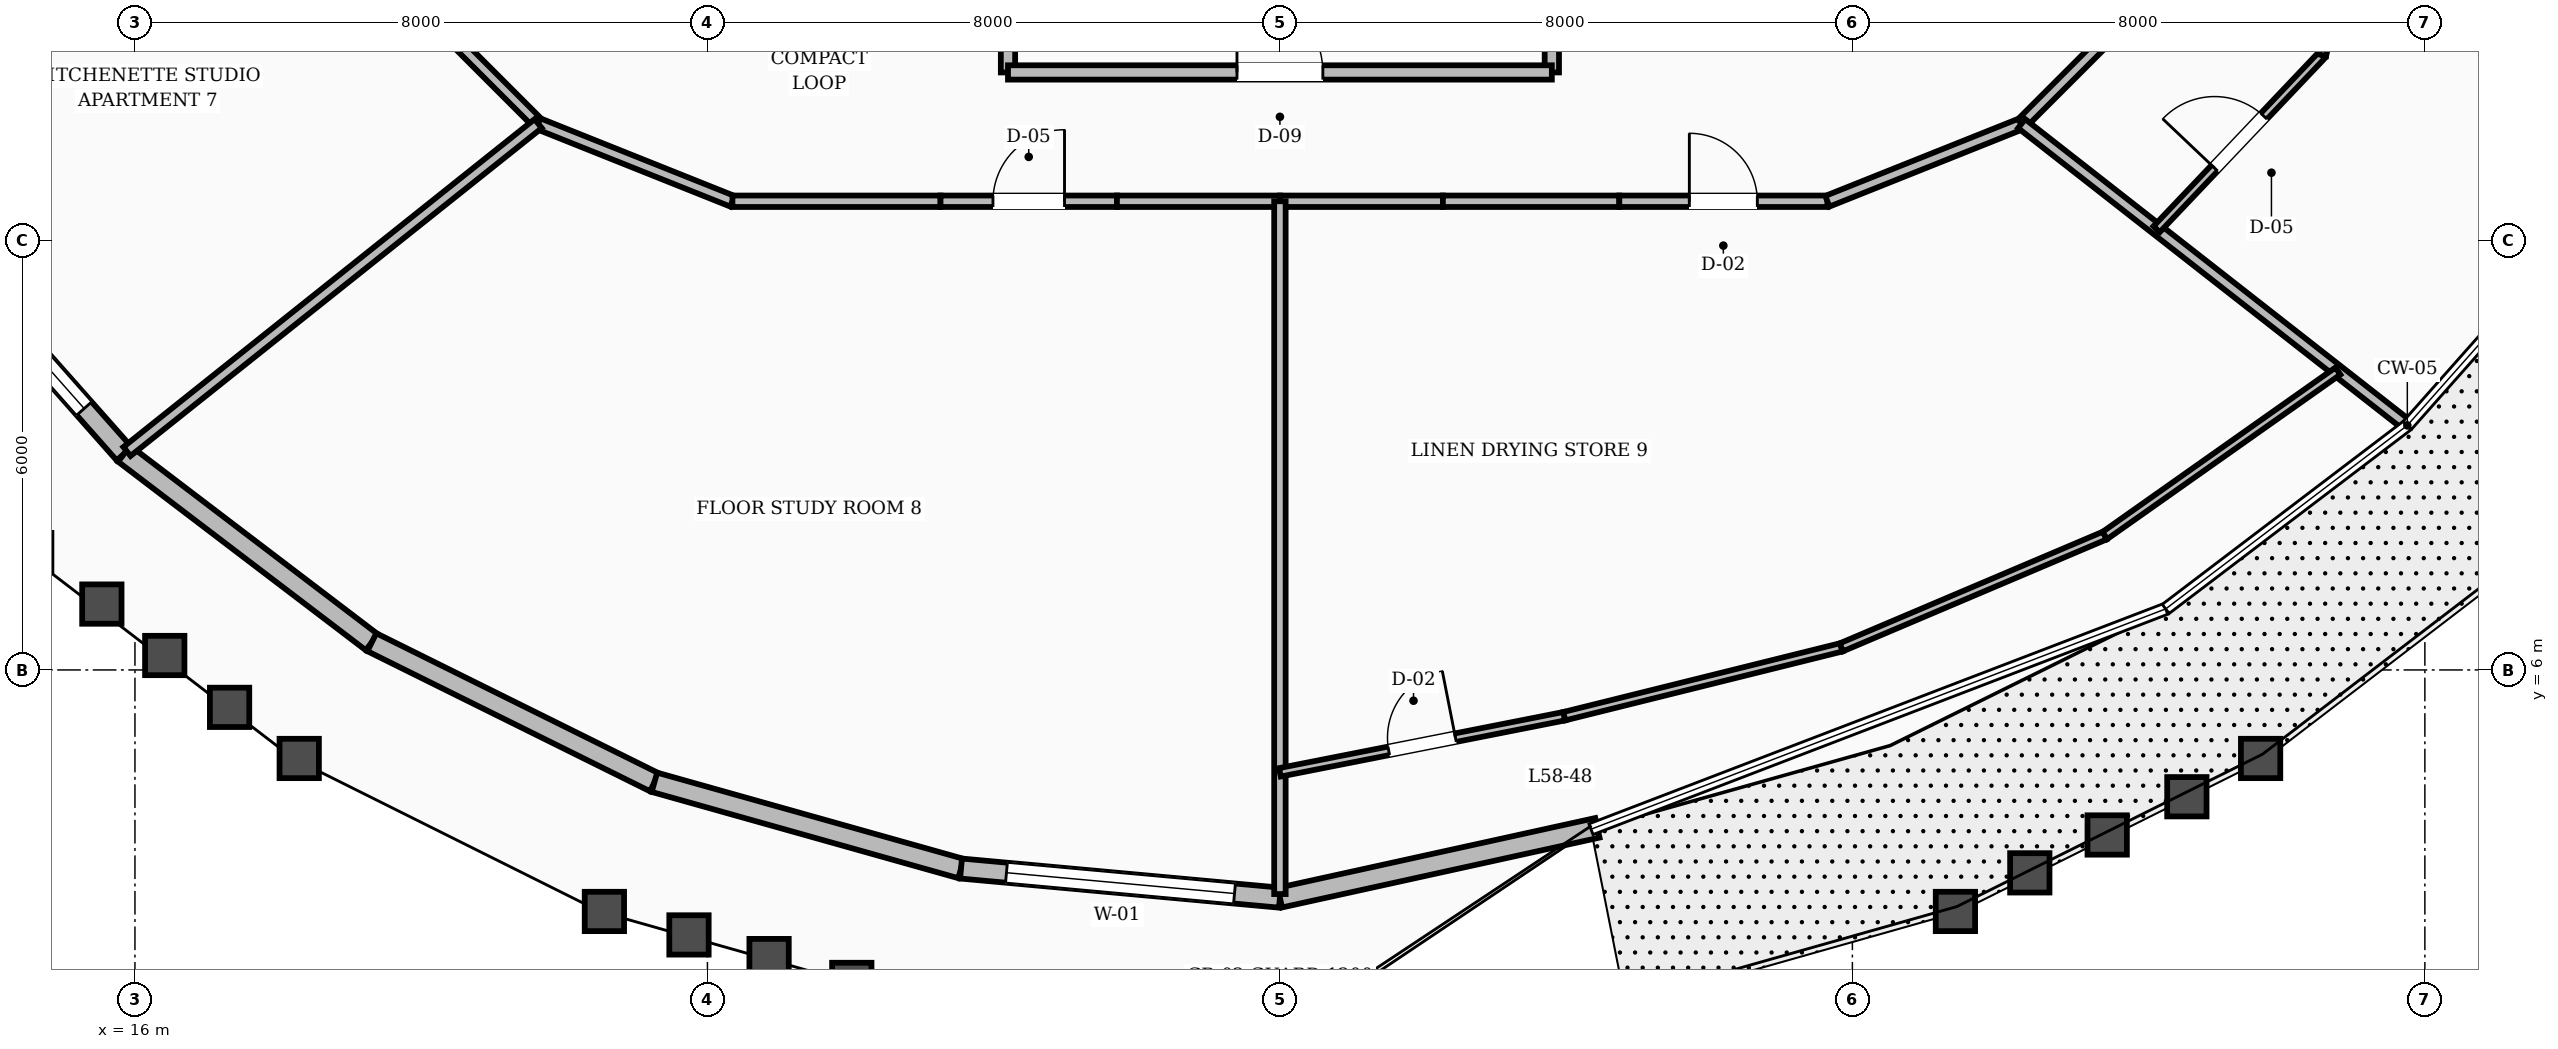
"""IFC4 building model, lengths in metres.
Left out: names, types, materials, properties, quantities, classifications, styles, units other than length and angle.
Written with IfcOpenShell. Run it as: python <this file> out.ifc"""

import sys

from ifc_helpers import new_model, si_unit, direction, frame, frame_2d, origin, place, context, subcontext, project, spatial, rectangle, extrude, element, fill, save


model = new_model("IFC4")
c1 = context("Model", 3, precision=1e-05, world=origin(), true_north=direction((0.0, 1.0)))
c2 = subcontext(c1, "Body", "Model", "MODEL_VIEW")
j1 = project(units=[si_unit("LENGTHUNIT", "METRE"), si_unit("PLANEANGLEUNIT", "RADIAN")], contexts=[c1])
p1 = place(None, origin())
s1 = spatial("IfcSite", under=j1, at=p1, CompositionType="ELEMENT")
p2 = place(p1, origin())
s2 = spatial("IfcBuilding", under=s1, at=p2, CompositionType="ELEMENT")
p3 = place(p2, frame((0.0, 0.0, 225.6)))
s3 = spatial("IfcBuildingStorey", under=s2, at=p3, CompositionType="ELEMENT", Elevation=225.6)
p4 = place(p3, frame((13.009, 12.232, 0.0), z_axis=(0.0, 0.0, 1.0), x_axis=(0.662704142497, -0.748881312037, 0.0)))
e1 = element("IfcWall", 1, at=p4, inside=s3, PredefinedType="STANDARD", context=c2, shape_type="SweptSolid", body=[
    extrude(rectangle(XDim=4.286, YDim=0.28, at=frame_2d((2.143, 0.0))), origin(), (0.0, 0.0, 1.0), 2.88),
])
p5 = place(p4, frame((0.843, 0.0, 0.8)))
e2 = element("IfcOpeningElement", 2, at=p5, cuts=e1, PredefinedType="OPENING", context=c2, shape_type="SweptSolid", body=[
    extrude(rectangle(XDim=2.6, YDim=1.65, at=frame_2d((1.3, 0.825))), frame((0.0, 0.15, 0.0), z_axis=(0.0, -1.0, 0.0), x_axis=(1.0, 0.0, 0.0)), (0.0, 0.0, 1.0), 0.3),
])
p6 = place(p3, frame((15.849, 9.022, 0.0), z_axis=(0.0, 0.0, 1.0), x_axis=(0.795722836513, -0.605660934394, 0.0)))
e3 = element("IfcWall", 3, at=p6, inside=s3, PredefinedType="STANDARD", context=c2, shape_type="SweptSolid", body=[
    extrude(rectangle(XDim=4.349, YDim=0.28, at=frame_2d((2.175, 0.0))), origin(), (0.0, 0.0, 1.0), 2.88),
])
p7 = place(p3, frame((19.31, 6.387, 0.0), z_axis=(0.0, 0.0, 1.0), x_axis=(0.89596177971, -0.44413116227, 0.0)))
e4 = element("IfcWall", 4, at=p7, inside=s3, PredefinedType="STANDARD", context=c2, shape_type="SweptSolid", body=[
    extrude(rectangle(XDim=4.407, YDim=0.28, at=frame_2d((2.204, 0.0))), origin(), (0.0, 0.0, 1.0), 2.88),
])
p8 = place(p3, frame((23.259, 4.43, 0.0), z_axis=(0.0, 0.0, 1.0), x_axis=(0.96263574912, -0.27079958367, 0.0)))
e5 = element("IfcWall", 5, at=p8, inside=s3, PredefinedType="STANDARD", context=c2, shape_type="SweptSolid", body=[
    extrude(rectangle(XDim=4.451, YDim=0.28, at=frame_2d((2.226, 0.0))), origin(), (0.0, 0.0, 1.0), 2.88),
])
p9 = place(p3, frame((27.544, 3.225, 0.0), z_axis=(0.0, 0.0, 1.0), x_axis=(0.995855104574, -0.090953893235, 0.0)))
e6 = element("IfcWall", 6, at=p9, inside=s3, PredefinedType="STANDARD", context=c2, shape_type="SweptSolid", body=[
    extrude(rectangle(XDim=4.475, YDim=0.28, at=frame_2d((2.237, 0.0))), origin(), (0.0, 0.0, 1.0), 2.88),
])
p10 = place(p9, frame((0.637, 0.0, 0.8)))
e7 = element("IfcOpeningElement", 7, at=p10, cuts=e6, PredefinedType="OPENING", context=c2, shape_type="SweptSolid", body=[
    extrude(rectangle(XDim=3.2, YDim=1.65, at=frame_2d((1.6, 0.825))), frame((0.0, 0.15, 0.0), z_axis=(0.0, -1.0, 0.0), x_axis=(1.0, 0.0, 0.0)), (0.0, 0.0, 1.0), 0.3),
])
p11 = place(p3, frame((32.0, 2.818, 0.0), z_axis=(0.0, 0.0, 1.0), x_axis=(0.976642662205, 0.214869984784, 0.0)))
e8 = element("IfcWall", 8, at=p11, inside=s3, PredefinedType="STANDARD", context=c2, shape_type="SweptSolid", body=[
    extrude(rectangle(XDim=4.543, YDim=0.28, at=frame_2d((2.271, 0.0))), origin(), (0.0, 0.0, 1.0), 2.88),
])
for number, where, z_axis, x_axis in (
    (9, (28.2, 14.35, 0.0), (0.0, 0.0, 1.0), (0.0, 1.0, 0.0)),
    (10, (35.8, 14.35, 0.0), (0.0, 0.0, 1.0), (0.0, 1.0, 0.0)),
):
    element("IfcWall", number, at=place(p3, frame(where, z_axis=z_axis, x_axis=x_axis)), inside=s3, PredefinedType="SOLIDWALL", context=c2, shape_type="SweptSolid", body=[
        extrude(rectangle(XDim=2.2, YDim=0.2, at=frame_2d((1.1, 0.0))), origin(), (0.0, 0.0, 1.0), 2.87),
    ])
p12 = place(p3, frame((28.2, 14.35, 0.0), z_axis=(0.0, 0.0, 1.0), x_axis=(1.0, 0.0, 0.0)))
e11 = element("IfcWall", 11, at=p12, inside=s3, PredefinedType="SOLIDWALL", context=c2, shape_type="SweptSolid", body=[
    extrude(rectangle(XDim=7.6, YDim=0.2, at=frame_2d((3.8, 0.0))), origin(), (0.0, 0.0, 1.0), 2.87),
])
p13 = place(p12, frame((3.2, 0.0, 0.0)))
e12 = element("IfcOpeningElement", 12, at=p13, cuts=e11, PredefinedType="OPENING", context=c2, shape_type="SweptSolid", body=[
    extrude(rectangle(XDim=1.2, YDim=2.1, at=frame_2d((0.6, 1.05))), frame((0.0, 0.11, 0.0), z_axis=(0.0, -1.0, 0.0), x_axis=(1.0, 0.0, 0.0)), (0.0, 0.0, 1.0), 0.22),
])
p14 = place(p3, frame((19.573, 15.697, 0.0), z_axis=(0.0, 0.0, 1.0), x_axis=(0.707106781187, -0.707106781187, 0.0)))
e13 = element("IfcWall", 13, at=p14, inside=s3, PredefinedType="SOLIDWALL", context=c2, shape_type="SweptSolid", body=[
    extrude(rectangle(XDim=2.916, YDim=0.16, at=frame_2d((1.458, 0.0))), origin(), (0.0, 0.0, 1.0), 2.87),
])
p15 = place(p3, frame((21.635, 13.635, 0.0), z_axis=(0.0, 0.0, 1.0), x_axis=(0.92856882165, -0.371160266542, 0.0)))
e14 = element("IfcWall", 14, at=p15, inside=s3, PredefinedType="SOLIDWALL", context=c2, shape_type="SweptSolid", body=[
    extrude(rectangle(XDim=2.923, YDim=0.16, at=frame_2d((1.461, 0.0))), origin(), (0.0, 0.0, 1.0), 2.87),
])
p16 = place(p3, frame((24.349, 12.55, 0.0), z_axis=(0.0, 0.0, 1.0), x_axis=(1.0, 0.0, 0.0)))
e15 = element("IfcWall", 15, at=p16, inside=s3, PredefinedType="SOLIDWALL", context=c2, shape_type="SweptSolid", body=[
    extrude(rectangle(XDim=2.908, YDim=0.16, at=frame_2d((1.454, 0.0))), origin(), (0.0, 0.0, 1.0), 2.87),
])
p17 = place(p3, frame((27.257, 12.55, 0.0), z_axis=(0.0, 0.0, 1.0), x_axis=(1.0, 0.0, 0.0)))
e16 = element("IfcWall", 16, at=p17, inside=s3, PredefinedType="SOLIDWALL", context=c2, shape_type="SweptSolid", body=[
    extrude(rectangle(XDim=2.465, YDim=0.16, at=frame_2d((1.232, 0.0))), origin(), (0.0, 0.0, 1.0), 2.87),
])
p18 = place(p17, frame((0.733, 0.0, 0.0)))
e17 = element("IfcOpeningElement", 17, at=p18, cuts=e16, PredefinedType="OPENING", context=c2, shape_type="SweptSolid", body=[
    extrude(rectangle(XDim=1.0, YDim=2.1, at=frame_2d((0.5, 1.05))), frame((0.0, 0.09, 0.0), z_axis=(0.0, -1.0, 0.0), x_axis=(1.0, 0.0, 0.0)), (0.0, 0.0, 1.0), 0.18),
])
for number, where, z_axis, x_axis in (
    (18, (29.722, 12.55, 0.0), (0.0, 0.0, 1.0), (1.0, 0.0, 0.0)),
    (19, (32.0, 12.55, 0.0), (0.0, 0.0, 1.0), (1.0, 0.0, 0.0)),
):
    element("IfcWall", number, at=place(p3, frame(where, z_axis=z_axis, x_axis=x_axis)), inside=s3, PredefinedType="SOLIDWALL", context=c2, shape_type="SweptSolid", body=[
        extrude(rectangle(XDim=2.278, YDim=0.16, at=frame_2d((1.139, 0.0))), origin(), (0.0, 0.0, 1.0), 2.87),
    ])
p19 = place(p3, frame((34.278, 12.55, 0.0), z_axis=(0.0, 0.0, 1.0), x_axis=(1.0, 0.0, 0.0)))
e20 = element("IfcWall", 20, at=p19, inside=s3, PredefinedType="SOLIDWALL", context=c2, shape_type="SweptSolid", body=[
    extrude(rectangle(XDim=2.465, YDim=0.16, at=frame_2d((1.232, 0.0))), origin(), (0.0, 0.0, 1.0), 2.87),
])
p20 = place(p3, frame((36.743, 12.55, 0.0), z_axis=(0.0, 0.0, 1.0), x_axis=(1.0, 0.0, 0.0)))
e21 = element("IfcWall", 21, at=p20, inside=s3, PredefinedType="SOLIDWALL", context=c2, shape_type="SweptSolid", body=[
    extrude(rectangle(XDim=2.908, YDim=0.16, at=frame_2d((1.454, 0.0))), origin(), (0.0, 0.0, 1.0), 2.87),
])
p21 = place(p20, frame((0.979, 0.0, 0.0)))
e22 = element("IfcOpeningElement", 22, at=p21, cuts=e21, PredefinedType="OPENING", context=c2, shape_type="SweptSolid", body=[
    extrude(rectangle(XDim=0.95, YDim=2.1, at=frame_2d((0.475, 1.05))), frame((0.0, 0.09, 0.0), z_axis=(0.0, -1.0, 0.0), x_axis=(1.0, 0.0, 0.0)), (0.0, 0.0, 1.0), 0.18),
])
p22 = place(p3, frame((39.651, 12.55, 0.0), z_axis=(0.0, 0.0, 1.0), x_axis=(0.92856882165, 0.371160266542, 0.0)))
e23 = element("IfcWall", 23, at=p22, inside=s3, PredefinedType="SOLIDWALL", context=c2, shape_type="SweptSolid", body=[
    extrude(rectangle(XDim=2.923, YDim=0.16, at=frame_2d((1.461, 0.0))), origin(), (0.0, 0.0, 1.0), 2.87),
])
p23 = place(p3, frame((42.365, 13.635, 0.0), z_axis=(0.0, 0.0, 1.0), x_axis=(0.707106781187, 0.707106781187, 0.0)))
e24 = element("IfcWall", 24, at=p23, inside=s3, PredefinedType="SOLIDWALL", context=c2, shape_type="SweptSolid", body=[
    extrude(rectangle(XDim=2.916, YDim=0.16, at=frame_2d((1.458, 0.0))), origin(), (0.0, 0.0, 1.0), 2.87),
])
p24 = place(p3, frame((42.365, 13.635, 0.0), z_axis=(0.0, 0.0, 1.0), x_axis=(0.78755504873, -0.61624430644, 0.0)))
e25 = element("IfcWall", 25, at=p24, inside=s3, PredefinedType="SOLIDWALL", context=c2, shape_type="SweptSolid", body=[
    extrude(rectangle(XDim=6.794, YDim=0.16, at=frame_2d((3.397, 0.0))), origin(), (0.0, 0.0, 1.0), 2.87),
])
p25 = place(p3, frame((44.251, 12.159, 0.0), z_axis=(0.0, 0.0, 1.0), x_axis=(0.688384139407, 0.725346314951, 0.0)))
e26 = element("IfcWall", 26, at=p25, inside=s3, PredefinedType="PARTITIONING", context=c2, shape_type="SweptSolid", body=[
    extrude(rectangle(XDim=3.355, YDim=0.12, at=frame_2d((1.678, 0.0))), origin(), (0.0, 0.0, 1.0), 2.87),
])
p26 = place(p25, frame((1.178, 0.0, 0.0)))
e27 = element("IfcOpeningElement", 27, at=p26, cuts=e26, PredefinedType="OPENING", context=c2, shape_type="SweptSolid", body=[
    extrude(rectangle(XDim=1.0, YDim=2.1, at=frame_2d((0.5, 1.05))), frame((0.0, 0.07, 0.0), z_axis=(0.0, -1.0, 0.0), x_axis=(1.0, 0.0, 0.0)), (0.0, 0.0, 1.0), 0.14),
])
p27 = place(p3, frame((46.561, 14.593, 0.0), z_axis=(0.0, 0.0, 1.0), x_axis=(0.224102977653, 0.974565470047, 0.0)))
e28 = element("IfcWall", 28, at=p27, inside=s3, PredefinedType="PARTITIONING", context=c2, shape_type="SweptSolid", body=[
    extrude(rectangle(XDim=3.371, YDim=0.12, at=frame_2d((1.685, 0.0))), origin(), (0.0, 0.0, 1.0), 2.87),
])
p28 = place(p3, frame((21.635, 13.635, 0.0), z_axis=(0.0, 0.0, 1.0), x_axis=(-0.781878901848, -0.623430335198, 0.0)))
e29 = element("IfcWall", 29, at=p28, inside=s3, PredefinedType="SOLIDWALL", context=c2, shape_type="SweptSolid", body=[
    extrude(rectangle(XDim=7.35, YDim=0.16, at=frame_2d((3.675, 0.0))), origin(), (0.0, 0.0, 1.0), 2.87),
])
p29 = place(p3, frame((32.0, 12.55, 0.0), z_axis=(0.0, 0.0, 1.0), x_axis=(0.0, -1.0, 0.0)))
e30 = element("IfcWall", 30, at=p29, inside=s3, PredefinedType="SOLIDWALL", context=c2, shape_type="SweptSolid", body=[
    extrude(rectangle(XDim=9.682, YDim=0.16, at=frame_2d((4.841, 0.0))), origin(), (0.0, 0.0, 1.0), 2.87),
])
p30 = place(p3, frame((32.0, 4.569, 0.0), z_axis=(0.0, 0.0, 1.0), x_axis=(0.98108276504, 0.19358876037, 0.0)))
e31 = element("IfcWall", 31, at=p30, inside=s3, PredefinedType="PARTITIONING", context=c2, shape_type="SweptSolid", body=[
    extrude(rectangle(XDim=4.051, YDim=0.12, at=frame_2d((2.025, 0.0))), origin(), (0.0, 0.0, 1.0), 2.87),
])
p31 = place(p30, frame((1.55, 0.0, 0.0)))
e32 = element("IfcOpeningElement", 32, at=p31, cuts=e31, PredefinedType="OPENING", context=c2, shape_type="SweptSolid", body=[
    extrude(rectangle(XDim=0.95, YDim=2.1, at=frame_2d((0.475, 1.05))), frame((0.0, 0.07, 0.0), z_axis=(0.0, -1.0, 0.0), x_axis=(1.0, 0.0, 0.0)), (0.0, 0.0, 1.0), 0.14),
])
p32 = place(p3, frame((35.974, 5.354, 0.0), z_axis=(0.0, 0.0, 1.0), x_axis=(0.970458495691, 0.241268125001, 0.0)))
e33 = element("IfcWall", 33, at=p32, inside=s3, PredefinedType="PARTITIONING", context=c2, shape_type="SweptSolid", body=[
    extrude(rectangle(XDim=3.989, YDim=0.12, at=frame_2d((1.995, 0.0))), origin(), (0.0, 0.0, 1.0), 2.87),
])
p33 = place(p3, frame((39.845, 6.316, 0.0), z_axis=(0.0, 0.0, 1.0), x_axis=(0.920547199032, 0.390631353521, 0.0)))
e34 = element("IfcWall", 34, at=p33, inside=s3, PredefinedType="PARTITIONING", context=c2, shape_type="SweptSolid", body=[
    extrude(rectangle(XDim=4.0, YDim=0.12, at=frame_2d((2.0, 0.0))), origin(), (0.0, 0.0, 1.0), 2.87),
])
p34 = place(p3, frame((43.527, 7.878, 0.0), z_axis=(0.0, 0.0, 1.0), x_axis=(0.817051015381, 0.576565380738, 0.0)))
e35 = element("IfcWall", 35, at=p34, inside=s3, PredefinedType="PARTITIONING", context=c2, shape_type="SweptSolid", body=[
    extrude(rectangle(XDim=3.987, YDim=0.12, at=frame_2d((1.993, 0.0))), origin(), (0.0, 0.0, 1.0), 2.87),
])
p35 = place(p5, origin())
e36 = element("IfcWindow", 36, at=p35, inside=s3, PartitioningType="SINGLE_PANEL", PredefinedType="WINDOW", context=c2, shape_type="SweptSolid", body=[
    extrude(rectangle(XDim=2.6, YDim=1.65, at=frame_2d((1.3, 0.825))), frame((0.0, 0.03, 0.0), z_axis=(0.0, -1.0, 0.0), x_axis=(1.0, 0.0, 0.0)), (0.0, 0.0, 1.0), 0.06),
])
fill(e2, e36)
p36 = place(p10, origin())
e37 = element("IfcWindow", 37, at=p36, inside=s3, PartitioningType="SINGLE_PANEL", PredefinedType="WINDOW", context=c2, shape_type="SweptSolid", body=[
    extrude(rectangle(XDim=3.2, YDim=1.65, at=frame_2d((1.6, 0.825))), frame((0.0, 0.03, 0.0), z_axis=(0.0, -1.0, 0.0), x_axis=(1.0, 0.0, 0.0)), (0.0, 0.0, 1.0), 0.06),
])
fill(e7, e37)
p37 = place(p13, origin())
e38 = element("IfcDoor", 38, at=p37, inside=s3, OperationType="SINGLE_SWING_LEFT", PredefinedType="DOOR", context=c2, shape_type="SweptSolid", body=[
    extrude(rectangle(XDim=1.2, YDim=2.1, at=frame_2d((0.6, 1.05))), frame((0.0, 0.025, 0.0), z_axis=(0.0, -1.0, 0.0), x_axis=(1.0, 0.0, 0.0)), (0.0, 0.0, 1.0), 0.05),
])
fill(e12, e38)
p38 = place(p26, origin())
e39 = element("IfcDoor", 39, at=p38, inside=s3, OperationType="SINGLE_SWING_LEFT", PredefinedType="DOOR", context=c2, shape_type="SweptSolid", body=[
    extrude(rectangle(XDim=1.0, YDim=2.1, at=frame_2d((0.5, 1.05))), frame((0.0, 0.025, 0.0), z_axis=(0.0, -1.0, 0.0), x_axis=(1.0, 0.0, 0.0)), (0.0, 0.0, 1.0), 0.05),
])
fill(e27, e39)
p39 = place(p18, origin())
e40 = element("IfcDoor", 40, at=p39, inside=s3, OperationType="SINGLE_SWING_RIGHT", PredefinedType="DOOR", context=c2, shape_type="SweptSolid", body=[
    extrude(rectangle(XDim=1.0, YDim=2.1, at=frame_2d((0.5, 1.05))), frame((0.0, 0.025, 0.0), z_axis=(0.0, -1.0, 0.0), x_axis=(1.0, 0.0, 0.0)), (0.0, 0.0, 1.0), 0.05),
])
fill(e17, e40)
p40 = place(p21, origin())
e41 = element("IfcDoor", 41, at=p40, inside=s3, OperationType="SINGLE_SWING_LEFT", PredefinedType="DOOR", context=c2, shape_type="SweptSolid", body=[
    extrude(rectangle(XDim=0.95, YDim=2.1, at=frame_2d((0.475, 1.05))), frame((0.0, 0.025, 0.0), z_axis=(0.0, -1.0, 0.0), x_axis=(1.0, 0.0, 0.0)), (0.0, 0.0, 1.0), 0.05),
])
fill(e22, e41)
p41 = place(p31, origin())
e42 = element("IfcDoor", 42, at=p41, inside=s3, OperationType="SINGLE_SWING_RIGHT", PredefinedType="DOOR", context=c2, shape_type="SweptSolid", body=[
    extrude(rectangle(XDim=0.95, YDim=2.1, at=frame_2d((0.475, 1.05))), frame((0.0, 0.025, 0.0), z_axis=(0.0, -1.0, 0.0), x_axis=(1.0, 0.0, 0.0)), (0.0, 0.0, 1.0), 0.05),
])
fill(e32, e42)
save(model, sys.argv[1])
